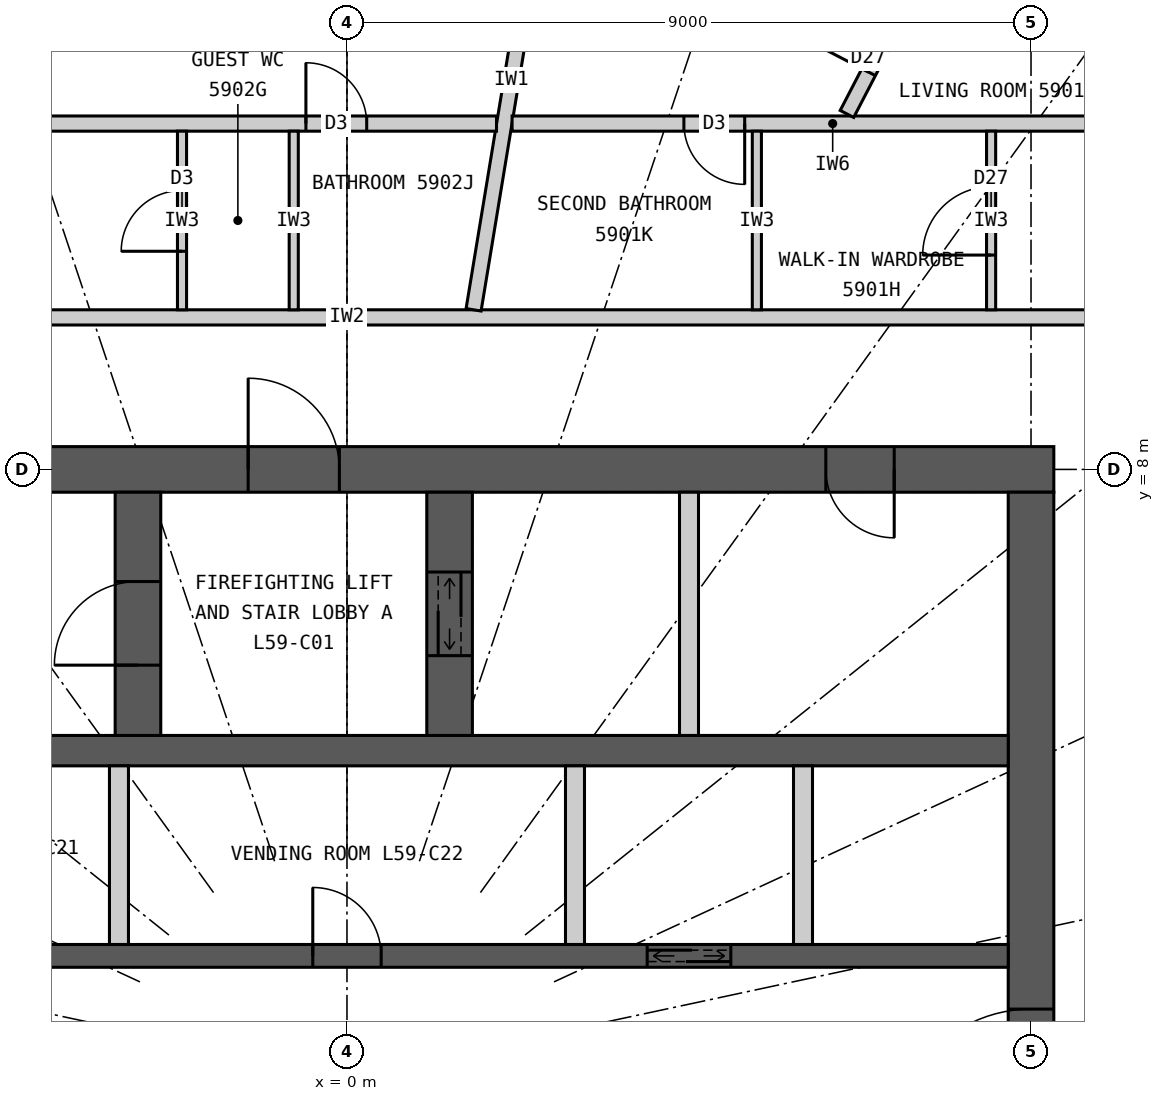
"""IFC4 building model, lengths in metres.
Left out: names, types, materials, properties, quantities, classifications, styles, units other than length and angle.
Written with IfcOpenShell. Run it as: python <this file> out.ifc"""

import sys

from ifc_helpers import new_model, si_unit, direction, frame, frame_2d, origin, origin_2d, place, context, subcontext, project, spatial, rectangle, circle, extrude, element, fill, save


model = new_model("IFC4")
c1 = context("Model", 3, precision=1e-05, world=origin(), true_north=direction((0.0, 1.0)))
c2 = subcontext(c1, "Body", "Model", "MODEL_VIEW")
j1 = project(units=[si_unit("LENGTHUNIT", "METRE"), si_unit("PLANEANGLEUNIT", "RADIAN")], contexts=[c1])
p1 = place(None, origin())
s1 = spatial("IfcSite", under=j1, at=p1, CompositionType="ELEMENT")
p2 = place(p1, origin())
s2 = spatial("IfcBuilding", under=s1, at=p2, CompositionType="ELEMENT")
p3 = place(p2, frame((0.0, 0.0, 219.3)))
s3 = spatial("IfcBuildingStorey", under=s2, at=p3, CompositionType="ELEMENT", Elevation=219.3)
p4 = place(p3, frame((10.019, 13.883, 0.0), z_axis=(0.0, 0.0, 1.0), x_axis=(1.0, 0.0, 0.0)))
e1 = element("IfcColumn", 1, at=p4, inside=s3, PredefinedType="COLUMN", context=c2, shape_type="SweptSolid", body=[
    extrude(circle(Radius=0.45, at=origin_2d()), origin(), (0.0, 0.0, 1.0), 3.3),
])
p5 = place(p3, frame((-9.3, 8.0, 0.0), z_axis=(0.0, 0.0, 1.0), x_axis=(1.0, 0.0, 0.0)))
e2 = element("IfcWall", 2, at=p5, inside=s3, PredefinedType="SHEAR", context=c2, shape_type="SweptSolid", body=[
    extrude(rectangle(XDim=18.6, YDim=0.6, at=frame_2d((9.3, 0.0))), origin(), (0.0, 0.0, 1.0), 3.3),
])
p6 = place(p5, frame((8.0, 0.0, 0.0)))
e3 = element("IfcOpeningElement", 3, at=p6, cuts=e2, PredefinedType="OPENING", context=c2, shape_type="SweptSolid", body=[
    extrude(rectangle(XDim=1.2, YDim=2.2, at=frame_2d((0.6, 1.1))), frame((0.0, 0.31, 0.0), z_axis=(0.0, -1.0, 0.0), x_axis=(1.0, 0.0, 0.0)), (0.0, 0.0, 1.0), 0.62),
])
p7 = place(p5, frame((15.6, 0.0, 0.0)))
e4 = element("IfcOpeningElement", 4, at=p7, cuts=e2, PredefinedType="OPENING", context=c2, shape_type="SweptSolid", body=[
    extrude(rectangle(XDim=0.9, YDim=2.2, at=frame_2d((0.45, 1.1))), frame((0.0, 0.31, 0.0), z_axis=(0.0, -1.0, 0.0), x_axis=(1.0, 0.0, 0.0)), (0.0, 0.0, 1.0), 0.62),
])
p8 = place(p3, frame((9.0, -7.7, 0.0), z_axis=(0.0, 0.0, 1.0), x_axis=(0.0, 1.0, 0.0)))
e5 = element("IfcWall", 5, at=p8, inside=s3, PredefinedType="SHEAR", context=c2, shape_type="SweptSolid", body=[
    extrude(rectangle(XDim=15.4, YDim=0.6, at=frame_2d((7.7, 0.0))), origin(), (0.0, 0.0, 1.0), 3.3),
])
p9 = place(p8, frame((6.8, 0.0, 0.0)))
e6 = element("IfcOpeningElement", 6, at=p9, cuts=e5, PredefinedType="OPENING", context=c2, shape_type="SweptSolid", body=[
    extrude(rectangle(XDim=1.8, YDim=2.2, at=frame_2d((0.9, 1.1))), frame((0.0, 0.31, 0.0), z_axis=(0.0, -1.0, 0.0), x_axis=(1.0, 0.0, 0.0)), (0.0, 0.0, 1.0), 0.62),
])
p10 = place(p3, frame((-8.7, 4.3, 0.0), z_axis=(0.0, 0.0, 1.0), x_axis=(1.0, 0.0, 0.0)))
e7 = element("IfcWall", 7, at=p10, inside=s3, PredefinedType="SHEAR", context=c2, shape_type="SweptSolid", body=[
    extrude(rectangle(XDim=17.4, YDim=0.4, at=frame_2d((8.7, 0.0))), origin(), (0.0, 0.0, 1.0), 3.3),
])
p11 = place(p3, frame((-8.7, 1.6, 0.0), z_axis=(0.0, 0.0, 1.0), x_axis=(1.0, 0.0, 0.0)))
e8 = element("IfcWall", 8, at=p11, inside=s3, PredefinedType="SHEAR", context=c2, shape_type="SweptSolid", body=[
    extrude(rectangle(XDim=17.4, YDim=0.3, at=frame_2d((8.7, 0.0))), origin(), (0.0, 0.0, 1.0), 3.3),
])
p12 = place(p11, frame((12.65, 0.0, 0.0)))
e9 = element("IfcOpeningElement", 9, at=p12, cuts=e8, PredefinedType="OPENING", context=c2, shape_type="SweptSolid", body=[
    extrude(rectangle(XDim=1.1, YDim=2.2, at=frame_2d((0.55, 1.1))), frame((0.0, 0.16, 0.0), z_axis=(0.0, -1.0, 0.0), x_axis=(1.0, 0.0, 0.0)), (0.0, 0.0, 1.0), 0.32),
])
p13 = place(p11, frame((2.25, 0.0, 0.0)))
e10 = element("IfcOpeningElement", 10, at=p13, cuts=e8, PredefinedType="OPENING", context=c2, shape_type="SweptSolid", body=[
    extrude(rectangle(XDim=0.9, YDim=2.2, at=frame_2d((0.45, 1.1))), frame((0.0, 0.16, 0.0), z_axis=(0.0, -1.0, 0.0), x_axis=(1.0, 0.0, 0.0)), (0.0, 0.0, 1.0), 0.32),
])
p14 = place(p11, frame((8.25, 0.0, 0.0)))
e11 = element("IfcOpeningElement", 11, at=p14, cuts=e8, PredefinedType="OPENING", context=c2, shape_type="SweptSolid", body=[
    extrude(rectangle(XDim=0.9, YDim=2.2, at=frame_2d((0.45, 1.1))), frame((0.0, 0.16, 0.0), z_axis=(0.0, -1.0, 0.0), x_axis=(1.0, 0.0, 0.0)), (0.0, 0.0, 1.0), 0.32),
])
p15 = place(p3, frame((-2.75, 4.5, 0.0), z_axis=(0.0, 0.0, 1.0), x_axis=(0.0, 1.0, 0.0)))
e12 = element("IfcWall", 12, at=p15, inside=s3, PredefinedType="SHEAR", context=c2, shape_type="SweptSolid", body=[
    extrude(rectangle(XDim=3.2, YDim=0.6, at=frame_2d((1.6, 0.0))), origin(), (0.0, 0.0, 1.0), 3.3),
])
p16 = place(p15, frame((0.925, 0.0, 0.0)))
e13 = element("IfcOpeningElement", 13, at=p16, cuts=e12, PredefinedType="OPENING", context=c2, shape_type="SweptSolid", body=[
    extrude(rectangle(XDim=1.1, YDim=2.2, at=frame_2d((0.55, 1.1))), frame((0.0, 0.31, 0.0), z_axis=(0.0, -1.0, 0.0), x_axis=(1.0, 0.0, 0.0)), (0.0, 0.0, 1.0), 0.62),
])
p17 = place(p3, frame((1.35, 4.5, 0.0), z_axis=(0.0, 0.0, 1.0), x_axis=(0.0, 1.0, 0.0)))
e14 = element("IfcWall", 14, at=p17, inside=s3, PredefinedType="SHEAR", context=c2, shape_type="SweptSolid", body=[
    extrude(rectangle(XDim=3.2, YDim=0.6, at=frame_2d((1.6, 0.0))), origin(), (0.0, 0.0, 1.0), 3.3),
])
p18 = place(p17, frame((1.05, 0.0, 0.0)))
e15 = element("IfcOpeningElement", 15, at=p18, cuts=e14, PredefinedType="OPENING", context=c2, shape_type="SweptSolid", body=[
    extrude(rectangle(XDim=1.1, YDim=2.2, at=frame_2d((0.55, 1.1))), frame((0.0, 0.31, 0.0), z_axis=(0.0, -1.0, 0.0), x_axis=(1.0, 0.0, 0.0)), (0.0, 0.0, 1.0), 0.62),
])
p19 = place(p3, frame((4.5, 4.5, 0.0), z_axis=(0.0, 0.0, 1.0), x_axis=(0.0, 1.0, 0.0)))
e16 = element("IfcWall", 16, at=p19, inside=s3, PredefinedType="PARTITIONING", context=c2, shape_type="SweptSolid", body=[
    extrude(rectangle(XDim=3.2, YDim=0.25, at=frame_2d((1.6, 0.0))), origin(), (0.0, 0.0, 1.0), 3.3),
])
for number, where, z_axis, x_axis in (
    (17, (-3.0, 1.75, 0.0), (0.0, 0.0, 1.0), (0.0, 1.0, 0.0)),
    (18, (3.0, 1.75, 0.0), (0.0, 0.0, 1.0), (0.0, 1.0, 0.0)),
    (19, (6.0, 1.75, 0.0), (0.0, 0.0, 1.0), (0.0, 1.0, 0.0)),
):
    element("IfcWall", number, at=place(p3, frame(where, z_axis=z_axis, x_axis=x_axis)), inside=s3, PredefinedType="PARTITIONING", context=c2, shape_type="SweptSolid", body=[
        extrude(rectangle(XDim=2.35, YDim=0.25, at=frame_2d((1.175, 0.0))), origin(), (0.0, 0.0, 1.0), 3.3),
    ])
p20 = place(p3, frame((-11.1, 10.0, 0.0), z_axis=(0.0, 0.0, 1.0), x_axis=(1.0, 0.0, 0.0)))
e20 = element("IfcWall", 20, at=p20, inside=s3, PredefinedType="PARTITIONING", context=c2, shape_type="SweptSolid", body=[
    extrude(rectangle(XDim=22.2, YDim=0.2, at=frame_2d((11.1, 0.0))), origin(), (0.0, 0.0, 1.0), 3.12),
])
p21 = place(p20, frame((20.9, 0.0, 0.0)))
e21 = element("IfcOpeningElement", 21, at=p21, cuts=e20, PredefinedType="OPENING", context=c2, shape_type="SweptSolid", body=[
    extrude(rectangle(XDim=1.0, YDim=2.2, at=frame_2d((0.5, 1.1))), frame((0.0, 0.11, 0.0), z_axis=(0.0, -1.0, 0.0), x_axis=(1.0, 0.0, 0.0)), (0.0, 0.0, 1.0), 0.22),
])
p22 = place(p20, frame((2.82, 0.0, 0.0)))
e22 = element("IfcOpeningElement", 22, at=p22, cuts=e20, PredefinedType="OPENING", context=c2, shape_type="SweptSolid", body=[
    extrude(rectangle(XDim=1.0, YDim=2.2, at=frame_2d((0.5, 1.1))), frame((0.0, 0.11, 0.0), z_axis=(0.0, -1.0, 0.0), x_axis=(1.0, 0.0, 0.0)), (0.0, 0.0, 1.0), 0.22),
])
p23 = place(p3, frame((1.666, 10.1, 0.0), z_axis=(0.0, 0.0, 1.0), x_axis=(0.162710847913, 0.986673796131, 0.0)))
e23 = element("IfcWall", 23, at=p23, inside=s3, PredefinedType="PARTITIONING", context=c2, shape_type="SweptSolid", body=[
    extrude(rectangle(XDim=6.122, YDim=0.2, at=frame_2d((3.061, 0.0))), origin(), (0.0, 0.0, 1.0), 3.12),
])
p24 = place(p3, frame((10.609, 12.55, 0.0), z_axis=(0.0, 0.0, 1.0), x_axis=(-1.0, 0.0, 0.0)))
e24 = element("IfcWall", 24, at=p24, inside=s3, PredefinedType="PARTITIONING", context=c2, shape_type="SweptSolid", body=[
    extrude(rectangle(XDim=8.437, YDim=0.2, at=frame_2d((4.218, 0.0))), origin(), (0.0, 0.0, 1.0), 3.12),
])
p25 = place(p24, frame((5.376, 0.0, 0.0)))
e25 = element("IfcOpeningElement", 25, at=p25, cuts=e24, PredefinedType="OPENING", context=c2, shape_type="SweptSolid", body=[
    extrude(rectangle(XDim=0.8, YDim=2.1, at=frame_2d((0.4, 1.05))), frame((0.0, 0.11, 0.0), z_axis=(0.0, -1.0, 0.0), x_axis=(1.0, 0.0, 0.0)), (0.0, 0.0, 1.0), 0.22),
])
p26 = place(p3, frame((6.578, 12.677, 0.0), z_axis=(0.0, 0.0, 1.0), x_axis=(0.460620531465, 0.887597164255, 0.0)))
e26 = element("IfcWall", 26, at=p26, inside=s3, PredefinedType="PARTITIONING", context=c2, shape_type="SweptSolid", body=[
    extrude(rectangle(XDim=2.678, YDim=0.2, at=frame_2d((1.339, 0.0))), origin(), (0.0, 0.0, 1.0), 3.12),
])
p27 = place(p26, frame((0.62, 0.0, 0.0)))
e27 = element("IfcOpeningElement", 27, at=p27, cuts=e26, PredefinedType="OPENING", context=c2, shape_type="SweptSolid", body=[
    extrude(rectangle(XDim=0.9, YDim=2.1, at=frame_2d((0.45, 1.05))), frame((0.0, 0.11, 0.0), z_axis=(0.0, -1.0, 0.0), x_axis=(1.0, 0.0, 0.0)), (0.0, 0.0, 1.0), 0.22),
])
p28 = place(p3, frame((8.475, 10.1, 0.0), z_axis=(0.0, 0.0, 1.0), x_axis=(0.0, 1.0, 0.0)))
e28 = element("IfcWall", 28, at=p28, inside=s3, PredefinedType="PARTITIONING", context=c2, shape_type="SweptSolid", body=[
    extrude(rectangle(XDim=2.35, YDim=0.12, at=frame_2d((1.175, 0.0))), origin(), (0.0, 0.0, 1.0), 3.12),
])
p29 = place(p28, frame((0.72, 0.0, 0.0)))
e29 = element("IfcOpeningElement", 29, at=p29, cuts=e28, PredefinedType="OPENING", context=c2, shape_type="SweptSolid", body=[
    extrude(rectangle(XDim=0.9, YDim=2.1, at=frame_2d((0.45, 1.05))), frame((0.0, 0.07, 0.0), z_axis=(0.0, -1.0, 0.0), x_axis=(1.0, 0.0, 0.0)), (0.0, 0.0, 1.0), 0.14),
])
p30 = place(p3, frame((5.393, 10.1, 0.0), z_axis=(0.0, 0.0, 1.0), x_axis=(0.0, 1.0, 0.0)))
e30 = element("IfcWall", 30, at=p30, inside=s3, PredefinedType="PARTITIONING", context=c2, shape_type="SweptSolid", body=[
    extrude(rectangle(XDim=2.35, YDim=0.12, at=frame_2d((1.175, 0.0))), origin(), (0.0, 0.0, 1.0), 3.12),
])
p31 = place(p3, frame((1.968, 12.55, 0.0), z_axis=(0.0, 0.0, 1.0), x_axis=(-1.0, 0.0, 0.0)))
e31 = element("IfcWall", 31, at=p31, inside=s3, PredefinedType="PARTITIONING", context=c2, shape_type="SweptSolid", body=[
    extrude(rectangle(XDim=12.576, YDim=0.2, at=frame_2d((6.288, 0.0))), origin(), (0.0, 0.0, 1.0), 3.12),
])
p32 = place(p31, frame((1.708, 0.0, 0.0)))
e32 = element("IfcOpeningElement", 32, at=p32, cuts=e31, PredefinedType="OPENING", context=c2, shape_type="SweptSolid", body=[
    extrude(rectangle(XDim=0.8, YDim=2.1, at=frame_2d((0.4, 1.05))), frame((0.0, 0.11, 0.0), z_axis=(0.0, -1.0, 0.0), x_axis=(1.0, 0.0, 0.0)), (0.0, 0.0, 1.0), 0.22),
])
p33 = place(p31, frame((6.62, 0.0, 0.0)))
e33 = element("IfcOpeningElement", 33, at=p33, cuts=e31, PredefinedType="OPENING", context=c2, shape_type="SweptSolid", body=[
    extrude(rectangle(XDim=0.9, YDim=2.1, at=frame_2d((0.45, 1.05))), frame((0.0, 0.11, 0.0), z_axis=(0.0, -1.0, 0.0), x_axis=(1.0, 0.0, 0.0)), (0.0, 0.0, 1.0), 0.22),
])
p34 = place(p3, frame((-0.7, 10.1, 0.0), z_axis=(0.0, 0.0, 1.0), x_axis=(0.0, 1.0, 0.0)))
e34 = element("IfcWall", 34, at=p34, inside=s3, PredefinedType="PARTITIONING", context=c2, shape_type="SweptSolid", body=[
    extrude(rectangle(XDim=2.35, YDim=0.12, at=frame_2d((1.175, 0.0))), origin(), (0.0, 0.0, 1.0), 3.12),
])
p35 = place(p3, frame((-2.17, 10.1, 0.0), z_axis=(0.0, 0.0, 1.0), x_axis=(0.0, 1.0, 0.0)))
e35 = element("IfcWall", 35, at=p35, inside=s3, PredefinedType="PARTITIONING", context=c2, shape_type="SweptSolid", body=[
    extrude(rectangle(XDim=2.35, YDim=0.12, at=frame_2d((1.175, 0.0))), origin(), (0.0, 0.0, 1.0), 3.12),
])
p36 = place(p35, frame((0.77, 0.0, 0.0)))
e36 = element("IfcOpeningElement", 36, at=p36, cuts=e35, PredefinedType="OPENING", context=c2, shape_type="SweptSolid", body=[
    extrude(rectangle(XDim=0.8, YDim=2.1, at=frame_2d((0.4, 1.05))), frame((0.0, 0.07, 0.0), z_axis=(0.0, -1.0, 0.0), x_axis=(1.0, 0.0, 0.0)), (0.0, 0.0, 1.0), 0.14),
])
p37 = place(p29, origin())
e37 = element("IfcDoor", 37, at=p37, inside=s3, OperationType="SINGLE_SWING_LEFT", PredefinedType="DOOR", context=c2, shape_type="SweptSolid", body=[
    extrude(rectangle(XDim=0.9, YDim=2.1, at=frame_2d((0.45, 1.05))), frame((0.0, 0.025, 0.0), z_axis=(0.0, -1.0, 0.0), x_axis=(1.0, 0.0, 0.0)), (0.0, 0.0, 1.0), 0.05),
])
fill(e29, e37)
p38 = place(p25, origin())
e38 = element("IfcDoor", 38, at=p38, inside=s3, OperationType="SINGLE_SWING_LEFT", PredefinedType="DOOR", context=c2, shape_type="SweptSolid", body=[
    extrude(rectangle(XDim=0.8, YDim=2.1, at=frame_2d((0.4, 1.05))), frame((0.0, 0.025, 0.0), z_axis=(0.0, -1.0, 0.0), x_axis=(1.0, 0.0, 0.0)), (0.0, 0.0, 1.0), 0.05),
])
fill(e25, e38)
p39 = place(p27, origin())
e39 = element("IfcDoor", 39, at=p39, inside=s3, OperationType="SINGLE_SWING_LEFT", PredefinedType="DOOR", context=c2, shape_type="SweptSolid", body=[
    extrude(rectangle(XDim=0.9, YDim=2.1, at=frame_2d((0.45, 1.05))), frame((0.0, 0.025, 0.0), z_axis=(0.0, -1.0, 0.0), x_axis=(1.0, 0.0, 0.0)), (0.0, 0.0, 1.0), 0.05),
])
fill(e27, e39)
p40 = place(p32, origin())
e40 = element("IfcDoor", 40, at=p40, inside=s3, OperationType="SINGLE_SWING_RIGHT", PredefinedType="DOOR", context=c2, shape_type="SweptSolid", body=[
    extrude(rectangle(XDim=0.8, YDim=2.1, at=frame_2d((0.4, 1.05))), frame((0.0, 0.025, 0.0), z_axis=(0.0, -1.0, 0.0), x_axis=(1.0, 0.0, 0.0)), (0.0, 0.0, 1.0), 0.05),
])
fill(e32, e40)
p41 = place(p36, origin())
e41 = element("IfcDoor", 41, at=p41, inside=s3, OperationType="SINGLE_SWING_LEFT", PredefinedType="DOOR", context=c2, shape_type="SweptSolid", body=[
    extrude(rectangle(XDim=0.8, YDim=2.1, at=frame_2d((0.4, 1.05))), frame((0.0, 0.025, 0.0), z_axis=(0.0, -1.0, 0.0), x_axis=(1.0, 0.0, 0.0)), (0.0, 0.0, 1.0), 0.05),
])
fill(e36, e41)
p42 = place(p6, origin())
e42 = element("IfcDoor", 42, at=p42, inside=s3, OperationType="SINGLE_SWING_LEFT", PredefinedType="DOOR", context=c2, shape_type="SweptSolid", body=[
    extrude(rectangle(XDim=1.2, YDim=2.2, at=frame_2d((0.6, 1.1))), frame((0.0, 0.025, 0.0), z_axis=(0.0, -1.0, 0.0), x_axis=(1.0, 0.0, 0.0)), (0.0, 0.0, 1.0), 0.05),
])
fill(e3, e42)
p43 = place(p16, origin())
e43 = element("IfcDoor", 43, at=p43, inside=s3, OperationType="SINGLE_SWING_LEFT", PredefinedType="DOOR", context=c2, shape_type="SweptSolid", body=[
    extrude(rectangle(XDim=1.1, YDim=2.2, at=frame_2d((0.55, 1.1))), frame((0.0, 0.025, 0.0), z_axis=(0.0, -1.0, 0.0), x_axis=(1.0, 0.0, 0.0)), (0.0, 0.0, 1.0), 0.05),
])
fill(e13, e43)
p44 = place(p18, origin())
e44 = element("IfcDoor", 44, at=p44, inside=s3, OperationType="DOUBLE_DOOR_SLIDING", PredefinedType="DOOR", context=c2, shape_type="SweptSolid", body=[
    extrude(rectangle(XDim=1.1, YDim=2.2, at=frame_2d((0.55, 1.1))), frame((0.0, 0.025, 0.0), z_axis=(0.0, -1.0, 0.0), x_axis=(1.0, 0.0, 0.0)), (0.0, 0.0, 1.0), 0.05),
])
fill(e15, e44)
p45 = place(p7, origin())
e45 = element("IfcDoor", 45, at=p45, inside=s3, OperationType="SINGLE_SWING_RIGHT", PredefinedType="DOOR", context=c2, shape_type="SweptSolid", body=[
    extrude(rectangle(XDim=0.9, YDim=2.2, at=frame_2d((0.45, 1.1))), frame((0.0, 0.025, 0.0), z_axis=(0.0, -1.0, 0.0), x_axis=(1.0, 0.0, 0.0)), (0.0, 0.0, 1.0), 0.05),
])
fill(e4, e45)
p46 = place(p12, origin())
e46 = element("IfcDoor", 46, at=p46, inside=s3, OperationType="DOUBLE_DOOR_SLIDING", PredefinedType="DOOR", context=c2, shape_type="SweptSolid", body=[
    extrude(rectangle(XDim=1.1, YDim=2.2, at=frame_2d((0.55, 1.1))), frame((0.0, 0.025, 0.0), z_axis=(0.0, -1.0, 0.0), x_axis=(1.0, 0.0, 0.0)), (0.0, 0.0, 1.0), 0.05),
])
fill(e9, e46)
p47 = place(p14, origin())
e47 = element("IfcDoor", 47, at=p47, inside=s3, OperationType="SINGLE_SWING_LEFT", PredefinedType="DOOR", context=c2, shape_type="SweptSolid", body=[
    extrude(rectangle(XDim=0.9, YDim=2.2, at=frame_2d((0.45, 1.1))), frame((0.0, 0.025, 0.0), z_axis=(0.0, -1.0, 0.0), x_axis=(1.0, 0.0, 0.0)), (0.0, 0.0, 1.0), 0.05),
])
fill(e11, e47)
p48 = place(p9, origin())
e48 = element("IfcDoor", 48, at=p48, inside=s3, OperationType="DOUBLE_DOOR_DOUBLE_SWING", PredefinedType="DOOR", context=c2, shape_type="SweptSolid", body=[
    extrude(rectangle(XDim=1.8, YDim=2.2, at=frame_2d((0.9, 1.1))), frame((0.0, 0.025, 0.0), z_axis=(0.0, -1.0, 0.0), x_axis=(1.0, 0.0, 0.0)), (0.0, 0.0, 1.0), 0.05),
])
fill(e6, e48)
save(model, sys.argv[1])
